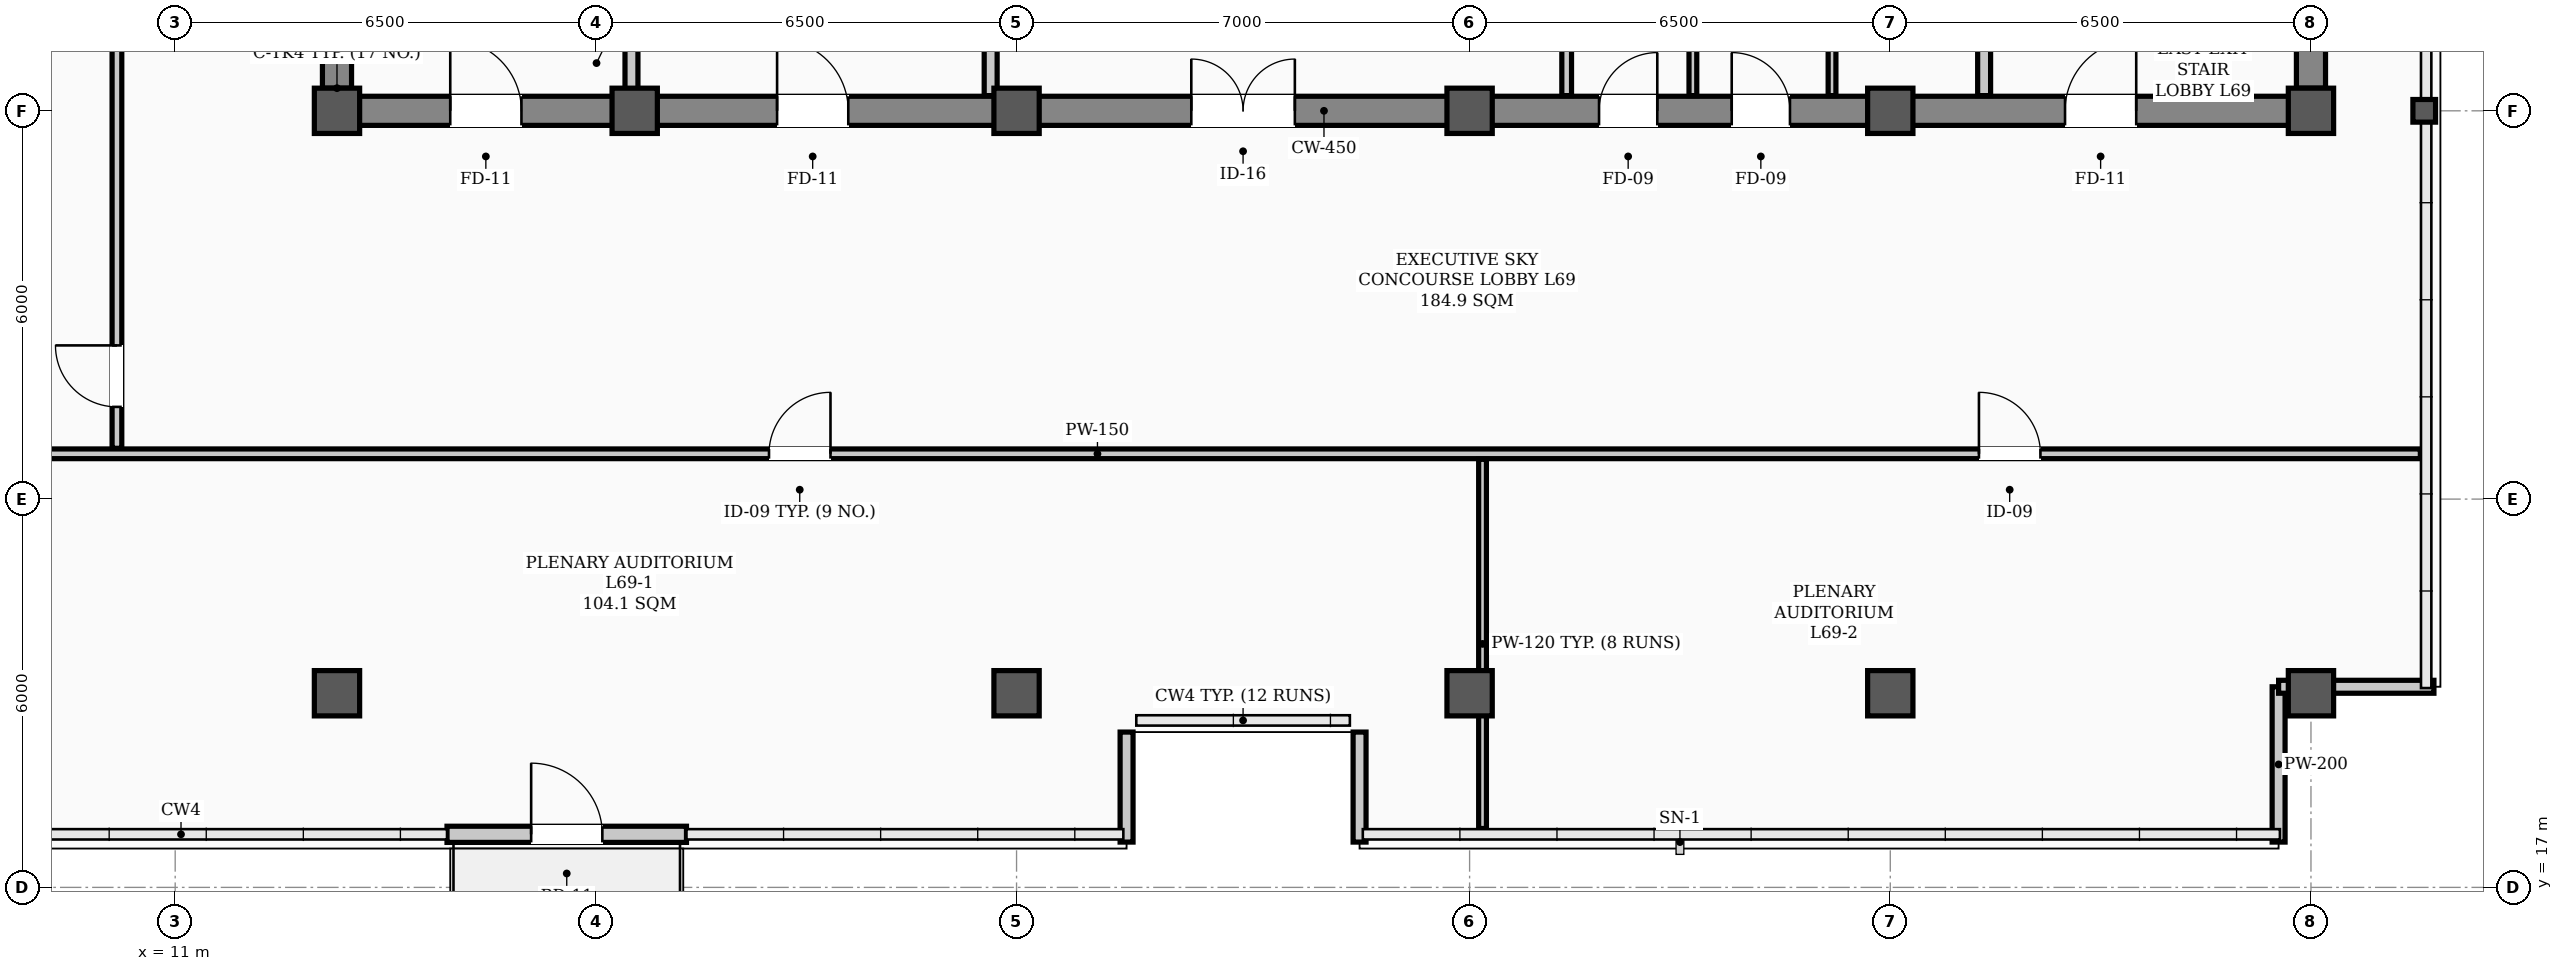
"""IFC4 building model, lengths in metres.
Left out: names, types, materials, properties, quantities, classifications, styles, units other than length and angle.
Written with IfcOpenShell. Run it as: python <this file> out.ifc"""

import sys

from ifc_helpers import new_model, si_unit, direction, frame, frame_2d, origin, origin_2d, place, context, subcontext, project, spatial, rectangle, hollow_rectangle, extrude, element, fill, save


model = new_model("IFC4")
c1 = context("Model", 3, precision=1e-05, world=origin(), true_north=direction((0.0, 1.0)))
c2 = subcontext(c1, "Body", "Model", "MODEL_VIEW")
j1 = project(units=[si_unit("LENGTHUNIT", "METRE"), si_unit("PLANEANGLEUNIT", "RADIAN")], contexts=[c1])
p1 = place(None, origin())
s1 = spatial("IfcSite", under=j1, at=p1, CompositionType="ELEMENT")
p2 = place(p1, origin())
s2 = spatial("IfcBuilding", under=s1, at=p2, CompositionType="ELEMENT")
p3 = place(p2, frame((0.0, 0.0, 277.4)))
s3 = spatial("IfcBuildingStorey", under=s2, at=p3, CompositionType="ELEMENT", Elevation=277.4)
for number, where, z_axis, x_axis in (
    (1, (13.5, 29.0, 0.0), (0.0, 0.0, 1.0), (1.0, 0.0, 0.0)),
    (2, (18.1, 29.0, 0.0), (0.0, 0.0, 1.0), (1.0, 0.0, 0.0)),
    (3, (24.0, 29.0, 0.0), (0.0, 0.0, 1.0), (1.0, 0.0, 0.0)),
    (4, (31.0, 29.0, 0.0), (0.0, 0.0, 1.0), (1.0, 0.0, 0.0)),
    (5, (37.5, 29.0, 0.0), (0.0, 0.0, 1.0), (1.0, 0.0, 0.0)),
    (6, (44.0, 29.0, 0.0), (0.0, 0.0, 1.0), (1.0, 0.0, 0.0)),
    (7, (13.5, 20.0, 0.0), (0.0, 0.0, 1.0), (1.0, 0.0, 0.0)),
    (8, (24.0, 20.0, 0.0), (0.0, 0.0, 1.0), (1.0, 0.0, 0.0)),
    (9, (31.0, 20.0, 0.0), (0.0, 0.0, 1.0), (1.0, 0.0, 0.0)),
    (10, (37.5, 20.0, 0.0), (0.0, 0.0, 1.0), (1.0, 0.0, 0.0)),
    (11, (44.0, 20.0, 0.0), (0.0, 0.0, 1.0), (1.0, 0.0, 0.0)),
):
    element("IfcColumn", number, at=place(p3, frame(where, z_axis=z_axis, x_axis=x_axis)), inside=s3, PredefinedType="COLUMN", context=c2, shape_type="SweptSolid", body=[
        extrude(hollow_rectangle(XDim=0.7, YDim=0.7, WallThickness=0.028, InnerFilletRadius=0.014, OuterFilletRadius=0.042, at=origin_2d()), origin(), (0.0, 0.0, 1.0), 3.9),
    ])
p4 = place(p3, frame((45.75, 29.0, -0.2), z_axis=(0.62617330898, 0.0, 0.779683902054), x_axis=(0.0, 1.0, 0.0)))
e12 = element("IfcColumn", 12, at=p4, inside=s3, PredefinedType="COLUMN", context=c2, shape_type="SweptSolid", body=[
    extrude(hollow_rectangle(XDim=0.35, YDim=0.35, WallThickness=0.016, InnerFilletRadius=0.016, OuterFilletRadius=0.032, at=origin_2d()), origin(), (0.0, 0.0, 1.0), 4.951),
])
p5 = place(p3, frame((43.5, 17.7, 0.0), z_axis=(0.0, 0.0, 1.0), x_axis=(0.0, 1.0, 0.0)))
e13 = element("IfcWall", 13, at=p5, inside=s3, PredefinedType="PARAPET", context=c2, shape_type="SweptSolid", body=[
    extrude(rectangle(XDim=2.4, YDim=0.2, at=frame_2d((1.2, 0.0))), origin(), (0.0, 0.0, 1.0), 1.2),
])
p6 = place(p3, frame((43.5, 20.1, 0.0), z_axis=(0.0, 0.0, 1.0), x_axis=(1.0, 0.0, 0.0)))
e14 = element("IfcWall", 14, at=p6, inside=s3, PredefinedType="PARAPET", context=c2, shape_type="SweptSolid", body=[
    extrude(rectangle(XDim=2.4, YDim=0.2, at=frame_2d((1.2, 0.0))), origin(), (0.0, 0.0, 1.0), 1.2),
])
for number, where, z_axis, x_axis in (
    (15, (25.7, 17.7, 0.0), (0.0, 0.0, 1.0), (0.0, 1.0, 0.0)),
    (16, (29.3, 19.4, 0.0), (0.0, 0.0, 1.0), (0.0, -1.0, 0.0)),
):
    element("IfcWall", number, at=place(p3, frame(where, z_axis=z_axis, x_axis=x_axis)), inside=s3, PredefinedType="PARAPET", context=c2, shape_type="SweptSolid", body=[
        extrude(rectangle(XDim=1.7, YDim=0.2, at=frame_2d((0.85, 0.0))), origin(), (0.0, 0.0, 1.0), 1.2),
    ])
p7 = place(p3, frame((15.2, 17.82, 0.0), z_axis=(0.0, 0.0, 1.0), x_axis=(1.0, 0.0, 0.0)))
e17 = element("IfcWall", 17, at=p7, inside=s3, PredefinedType="STANDARD", context=c2, shape_type="SweptSolid", body=[
    extrude(rectangle(XDim=3.7, YDim=0.25, at=frame_2d((1.85, 0.0))), origin(), (0.0, 0.0, 1.0), 2.22),
])
p8 = place(p7, frame((1.3, 0.0, 0.0)))
e18 = element("IfcOpeningElement", 18, at=p8, cuts=e17, PredefinedType="OPENING", context=c2, shape_type="SweptSolid", body=[
    extrude(rectangle(XDim=1.1, YDim=2.2, at=frame_2d((0.55, 1.1))), frame((0.0, 0.135, 0.0), z_axis=(0.0, -1.0, 0.0), x_axis=(1.0, 0.0, 0.0)), (0.0, 0.0, 1.0), 0.27),
])
p9 = place(p3, frame((13.5, 29.0, 0.0), z_axis=(0.0, 0.0, 1.0), x_axis=(1.0, 0.0, 0.0)))
e19 = element("IfcWall", 19, at=p9, inside=s3, PredefinedType="SHEAR", context=c2, shape_type="SweptSolid", body=[
    extrude(rectangle(XDim=30.5, YDim=0.45, at=frame_2d((15.25, 0.0))), origin(), (0.0, 0.0, 1.0), 3.66),
])
p10 = place(p9, frame((1.75, 0.0, 0.0)))
e20 = element("IfcOpeningElement", 20, at=p10, cuts=e19, PredefinedType="OPENING", context=c2, shape_type="SweptSolid", body=[
    extrude(rectangle(XDim=1.1, YDim=2.08, at=frame_2d((0.55, 1.04))), frame((0.0, 0.235, 0.0), z_axis=(0.0, -1.0, 0.0), x_axis=(1.0, 0.0, 0.0)), (0.0, 0.0, 1.0), 0.47),
])
p11 = place(p9, frame((26.7, 0.0, 0.0)))
e21 = element("IfcOpeningElement", 21, at=p11, cuts=e19, PredefinedType="OPENING", context=c2, shape_type="SweptSolid", body=[
    extrude(rectangle(XDim=1.1, YDim=2.08, at=frame_2d((0.55, 1.04))), frame((0.0, 0.235, 0.0), z_axis=(0.0, -1.0, 0.0), x_axis=(1.0, 0.0, 0.0)), (0.0, 0.0, 1.0), 0.47),
])
p12 = place(p9, frame((6.8, 0.0, 0.0)))
e22 = element("IfcOpeningElement", 22, at=p12, cuts=e19, PredefinedType="OPENING", context=c2, shape_type="SweptSolid", body=[
    extrude(rectangle(XDim=1.1, YDim=2.08, at=frame_2d((0.55, 1.04))), frame((0.0, 0.235, 0.0), z_axis=(0.0, -1.0, 0.0), x_axis=(1.0, 0.0, 0.0)), (0.0, 0.0, 1.0), 0.47),
])
p13 = place(p9, frame((13.2, 0.0, 0.0)))
e23 = element("IfcOpeningElement", 23, at=p13, cuts=e19, PredefinedType="OPENING", context=c2, shape_type="SweptSolid", body=[
    extrude(rectangle(XDim=1.6, YDim=2.08, at=frame_2d((0.8, 1.04))), frame((0.0, 0.235, 0.0), z_axis=(0.0, -1.0, 0.0), x_axis=(1.0, 0.0, 0.0)), (0.0, 0.0, 1.0), 0.47),
])
p14 = place(p9, frame((19.5, 0.0, 0.0)))
e24 = element("IfcOpeningElement", 24, at=p14, cuts=e19, PredefinedType="OPENING", context=c2, shape_type="SweptSolid", body=[
    extrude(rectangle(XDim=0.9, YDim=2.08, at=frame_2d((0.45, 1.04))), frame((0.0, 0.235, 0.0), z_axis=(0.0, -1.0, 0.0), x_axis=(1.0, 0.0, 0.0)), (0.0, 0.0, 1.0), 0.47),
])
p15 = place(p9, frame((21.55, 0.0, 0.0)))
e25 = element("IfcOpeningElement", 25, at=p15, cuts=e19, PredefinedType="OPENING", context=c2, shape_type="SweptSolid", body=[
    extrude(rectangle(XDim=0.9, YDim=2.08, at=frame_2d((0.45, 1.04))), frame((0.0, 0.235, 0.0), z_axis=(0.0, -1.0, 0.0), x_axis=(1.0, 0.0, 0.0)), (0.0, 0.0, 1.0), 0.47),
])
for number, where, z_axis, x_axis in (
    (26, (13.5, 29.35, 0.0), (0.0, 0.0, 1.0), (0.0, 1.0, 0.0)),
    (27, (44.0, 29.35, 0.0), (0.0, 0.0, 1.0), (0.0, 1.0, 0.0)),
):
    element("IfcWall", number, at=place(p3, frame(where, z_axis=z_axis, x_axis=x_axis)), inside=s3, PredefinedType="SHEAR", context=c2, shape_type="SweptSolid", body=[
        extrude(rectangle(XDim=8.6, YDim=0.45, at=frame_2d((4.3, 0.0))), origin(), (0.0, 0.0, 1.0), 3.66),
    ])
p16 = place(p3, frame((4.81, 23.7, 0.0), z_axis=(0.0, 0.0, 1.0), x_axis=(1.0, 0.0, 0.0)))
e28 = element("IfcWall", 28, at=p16, inside=s3, PredefinedType="PARTITIONING", context=c2, shape_type="SweptSolid", body=[
    extrude(rectangle(XDim=40.88, YDim=0.15, at=frame_2d((20.44, 0.0))), origin(), (0.0, 0.0, 1.0), 2.24),
])
p17 = place(p16, frame((15.365, 0.0, 0.0)))
e29 = element("IfcOpeningElement", 29, at=p17, cuts=e28, PredefinedType="OPENING", context=c2, shape_type="SweptSolid", body=[
    extrude(rectangle(XDim=0.95, YDim=2.08, at=frame_2d((0.475, 1.04))), frame((0.0, 0.085, 0.0), z_axis=(0.0, -1.0, 0.0), x_axis=(1.0, 0.0, 0.0)), (0.0, 0.0, 1.0), 0.17),
])
p18 = place(p16, frame((34.06, 0.0, 0.0)))
e30 = element("IfcOpeningElement", 30, at=p18, cuts=e28, PredefinedType="OPENING", context=c2, shape_type="SweptSolid", body=[
    extrude(rectangle(XDim=0.95, YDim=2.08, at=frame_2d((0.475, 1.04))), frame((0.0, 0.085, 0.0), z_axis=(0.0, -1.0, 0.0), x_axis=(1.0, 0.0, 0.0)), (0.0, 0.0, 1.0), 0.17),
])
for number, where, z_axis, x_axis in (
    (31, (18.05, 29.235, 0.0), (0.0, 0.0, 1.0), (0.0, 1.0, 0.0)),
    (32, (38.95, 29.235, 0.0), (0.0, 0.0, 1.0), (0.0, 1.0, 0.0)),
):
    element("IfcWall", number, at=place(p3, frame(where, z_axis=z_axis, x_axis=x_axis)), inside=s3, PredefinedType="STANDARD", context=c2, shape_type="SweptSolid", body=[
        extrude(rectangle(XDim=1.065, YDim=0.2, at=frame_2d((0.532, 0.0))), origin(), (0.0, 0.0, 1.0), 2.24),
    ])
p19 = place(p3, frame((23.6, 29.235, 0.0), z_axis=(0.0, 0.0, 1.0), x_axis=(0.0, 1.0, 0.0)))
e33 = element("IfcWall", 33, at=p19, inside=s3, PredefinedType="STANDARD", context=c2, shape_type="SweptSolid", body=[
    extrude(rectangle(XDim=5.465, YDim=0.2, at=frame_2d((2.732, 0.0))), origin(), (0.0, 0.0, 1.0), 2.24),
])
p20 = place(p3, frame((32.5, 29.235, 0.0), z_axis=(0.0, 0.0, 1.0), x_axis=(0.0, 1.0, 0.0)))
e34 = element("IfcWall", 34, at=p20, inside=s3, PredefinedType="PARTITIONING", context=c2, shape_type="SweptSolid", body=[
    extrude(rectangle(XDim=2.53, YDim=0.15, at=frame_2d((1.265, 0.0))), origin(), (0.0, 0.0, 1.0), 2.24),
])
for number, where, z_axis, x_axis in (
    (35, (36.6, 29.235, 0.0), (0.0, 0.0, 1.0), (0.0, 1.0, 0.0)),
    (36, (34.45, 29.235, 0.0), (0.0, 0.0, 1.0), (0.0, 1.0, 0.0)),
):
    element("IfcWall", number, at=place(p3, frame(where, z_axis=z_axis, x_axis=x_axis)), inside=s3, PredefinedType="PARTITIONING", context=c2, shape_type="SweptSolid", body=[
        extrude(rectangle(XDim=2.53, YDim=0.12, at=frame_2d((1.265, 0.0))), origin(), (0.0, 0.0, 1.0), 2.24),
    ])
p21 = place(p3, frame((10.1, 23.785, 0.0), z_axis=(0.0, 0.0, 1.0), x_axis=(0.0, 1.0, 0.0)))
e37 = element("IfcWall", 37, at=p21, inside=s3, PredefinedType="PARTITIONING", context=c2, shape_type="SweptSolid", body=[
    extrude(rectangle(XDim=17.88, YDim=0.15, at=frame_2d((8.94, 0.0))), origin(), (0.0, 0.0, 1.0), 2.24),
])
p22 = place(p21, frame((0.64, 0.0, 0.0)))
e38 = element("IfcOpeningElement", 38, at=p22, cuts=e37, PredefinedType="OPENING", context=c2, shape_type="SweptSolid", body=[
    extrude(rectangle(XDim=0.95, YDim=2.08, at=frame_2d((0.475, 1.04))), frame((0.0, 0.085, 0.0), z_axis=(0.0, -1.0, 0.0), x_axis=(1.0, 0.0, 0.0)), (0.0, 0.0, 1.0), 0.17),
])
p23 = place(p21, frame((9.94, 0.0, 0.0)))
e39 = element("IfcOpeningElement", 39, at=p23, cuts=e37, PredefinedType="OPENING", context=c2, shape_type="SweptSolid", body=[
    extrude(rectangle(XDim=0.95, YDim=2.08, at=frame_2d((0.475, 1.04))), frame((0.0, 0.085, 0.0), z_axis=(0.0, -1.0, 0.0), x_axis=(1.0, 0.0, 0.0)), (0.0, 0.0, 1.0), 0.17),
])
p24 = place(p21, frame((14.615, 0.0, 0.0)))
e40 = element("IfcOpeningElement", 40, at=p24, cuts=e37, PredefinedType="OPENING", context=c2, shape_type="SweptSolid", body=[
    extrude(rectangle(XDim=0.95, YDim=2.08, at=frame_2d((0.475, 1.04))), frame((0.0, 0.085, 0.0), z_axis=(0.0, -1.0, 0.0), x_axis=(1.0, 0.0, 0.0)), (0.0, 0.0, 1.0), 0.17),
])
p25 = place(p3, frame((31.2, 17.91, 0.0), z_axis=(0.0, 0.0, 1.0), x_axis=(0.0, 1.0, 0.0)))
e41 = element("IfcWall", 41, at=p25, inside=s3, PredefinedType="PARTITIONING", context=c2, shape_type="SweptSolid", body=[
    extrude(rectangle(XDim=5.705, YDim=0.12, at=frame_2d((2.853, 0.0))), origin(), (0.0, 0.0, 1.0), 2.24),
])
p26 = place(p8, origin())
e42 = element("IfcDoor", 42, at=p26, inside=s3, OperationType="SINGLE_SWING_LEFT", PredefinedType="DOOR", context=c2, shape_type="SweptSolid", body=[
    extrude(rectangle(XDim=1.1, YDim=2.2, at=frame_2d((0.55, 1.1))), frame((0.0, 0.025, 0.0), z_axis=(0.0, -1.0, 0.0), x_axis=(1.0, 0.0, 0.0)), (0.0, 0.0, 1.0), 0.05),
])
fill(e18, e42)
p27 = place(p10, origin())
e43 = element("IfcDoor", 43, at=p27, inside=s3, OperationType="SINGLE_SWING_LEFT", PredefinedType="DOOR", context=c2, shape_type="SweptSolid", body=[
    extrude(rectangle(XDim=1.1, YDim=2.08, at=frame_2d((0.55, 1.04))), frame((0.0, 0.025, 0.0), z_axis=(0.0, -1.0, 0.0), x_axis=(1.0, 0.0, 0.0)), (0.0, 0.0, 1.0), 0.05),
])
fill(e20, e43)
p28 = place(p11, origin())
e44 = element("IfcDoor", 44, at=p28, inside=s3, OperationType="SINGLE_SWING_RIGHT", PredefinedType="DOOR", context=c2, shape_type="SweptSolid", body=[
    extrude(rectangle(XDim=1.1, YDim=2.08, at=frame_2d((0.55, 1.04))), frame((0.0, 0.025, 0.0), z_axis=(0.0, -1.0, 0.0), x_axis=(1.0, 0.0, 0.0)), (0.0, 0.0, 1.0), 0.05),
])
fill(e21, e44)
p29 = place(p12, origin())
e45 = element("IfcDoor", 45, at=p29, inside=s3, OperationType="SINGLE_SWING_LEFT", PredefinedType="DOOR", context=c2, shape_type="SweptSolid", body=[
    extrude(rectangle(XDim=1.1, YDim=2.08, at=frame_2d((0.55, 1.04))), frame((0.0, 0.025, 0.0), z_axis=(0.0, -1.0, 0.0), x_axis=(1.0, 0.0, 0.0)), (0.0, 0.0, 1.0), 0.05),
])
fill(e22, e45)
p30 = place(p13, origin())
e46 = element("IfcDoor", 46, at=p30, inside=s3, OperationType="DOUBLE_DOOR_SINGLE_SWING", PredefinedType="DOOR", context=c2, shape_type="SweptSolid", body=[
    extrude(rectangle(XDim=1.6, YDim=2.08, at=frame_2d((0.8, 1.04))), frame((0.0, 0.025, 0.0), z_axis=(0.0, -1.0, 0.0), x_axis=(1.0, 0.0, 0.0)), (0.0, 0.0, 1.0), 0.05),
])
fill(e23, e46)
p31 = place(p14, origin())
e47 = element("IfcDoor", 47, at=p31, inside=s3, OperationType="SINGLE_SWING_RIGHT", PredefinedType="DOOR", context=c2, shape_type="SweptSolid", body=[
    extrude(rectangle(XDim=0.9, YDim=2.08, at=frame_2d((0.45, 1.04))), frame((0.0, 0.025, 0.0), z_axis=(0.0, -1.0, 0.0), x_axis=(1.0, 0.0, 0.0)), (0.0, 0.0, 1.0), 0.05),
])
fill(e24, e47)
p32 = place(p15, origin())
e48 = element("IfcDoor", 48, at=p32, inside=s3, OperationType="SINGLE_SWING_LEFT", PredefinedType="DOOR", context=c2, shape_type="SweptSolid", body=[
    extrude(rectangle(XDim=0.9, YDim=2.08, at=frame_2d((0.45, 1.04))), frame((0.0, 0.025, 0.0), z_axis=(0.0, -1.0, 0.0), x_axis=(1.0, 0.0, 0.0)), (0.0, 0.0, 1.0), 0.05),
])
fill(e25, e48)
p33 = place(p17, origin())
e49 = element("IfcDoor", 49, at=p33, inside=s3, OperationType="SINGLE_SWING_RIGHT", PredefinedType="DOOR", context=c2, shape_type="SweptSolid", body=[
    extrude(rectangle(XDim=0.95, YDim=2.08, at=frame_2d((0.475, 1.04))), frame((0.0, 0.025, 0.0), z_axis=(0.0, -1.0, 0.0), x_axis=(1.0, 0.0, 0.0)), (0.0, 0.0, 1.0), 0.05),
])
fill(e29, e49)
p34 = place(p18, origin())
e50 = element("IfcDoor", 50, at=p34, inside=s3, OperationType="SINGLE_SWING_LEFT", PredefinedType="DOOR", context=c2, shape_type="SweptSolid", body=[
    extrude(rectangle(XDim=0.95, YDim=2.08, at=frame_2d((0.475, 1.04))), frame((0.0, 0.025, 0.0), z_axis=(0.0, -1.0, 0.0), x_axis=(1.0, 0.0, 0.0)), (0.0, 0.0, 1.0), 0.05),
])
fill(e30, e50)
p35 = place(p22, origin())
e51 = element("IfcDoor", 51, at=p35, inside=s3, OperationType="SINGLE_SWING_RIGHT", PredefinedType="DOOR", context=c2, shape_type="SweptSolid", body=[
    extrude(rectangle(XDim=0.95, YDim=2.08, at=frame_2d((0.475, 1.04))), frame((0.0, 0.025, 0.0), z_axis=(0.0, -1.0, 0.0), x_axis=(1.0, 0.0, 0.0)), (0.0, 0.0, 1.0), 0.05),
])
fill(e38, e51)
save(model, sys.argv[1])
